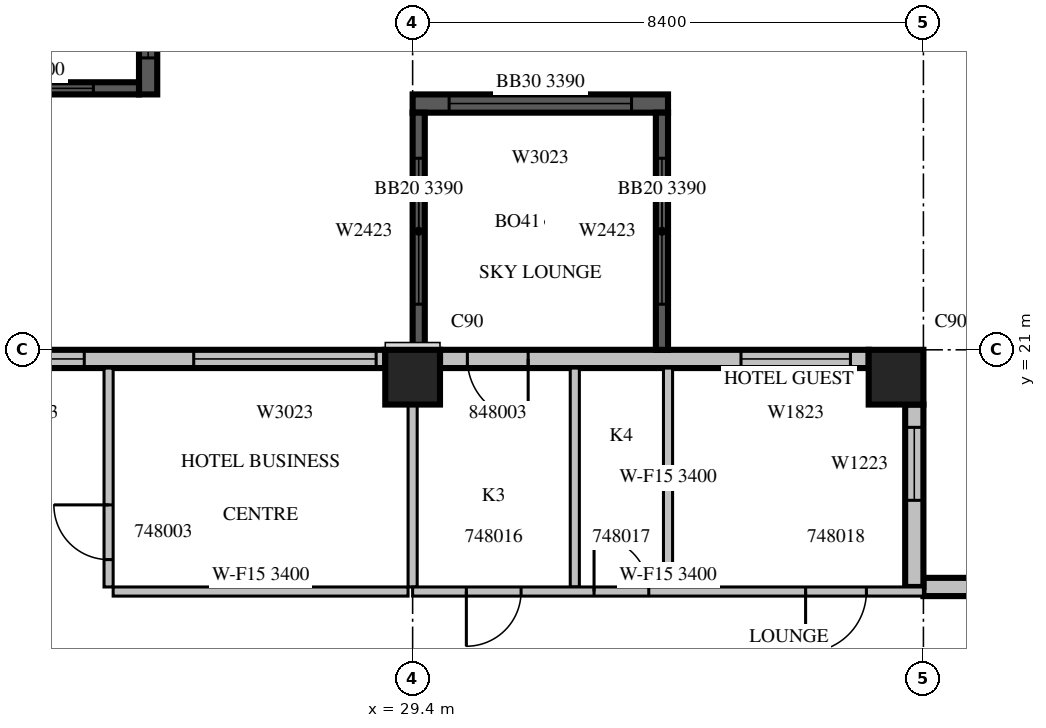
"""IFC4 building model, lengths in metres.
Left out: names, types, materials, properties, quantities, classifications, styles, units other than length and angle.
Written with IfcOpenShell. Run it as: python <this file> out.ifc"""

import sys

from ifc_helpers import new_model, si_unit, direction, frame, frame_2d, origin, origin_2d, place, context, subcontext, project, spatial, rectangle, extrude, source, transform, mapped, element, fill, save


model = new_model("IFC4")
c1 = context("Model", 3, precision=1e-05, world=origin(), true_north=direction((0.0, 1.0)))
c2 = subcontext(c1, "Body", "Model", "MODEL_VIEW")
j1 = project(units=[si_unit("LENGTHUNIT", "METRE"), si_unit("PLANEANGLEUNIT", "RADIAN")], contexts=[c1])
p1 = place(None, origin())
s1 = spatial("IfcSite", under=j1, at=p1, CompositionType="ELEMENT")
p2 = place(p1, origin())
s2 = spatial("IfcBuilding", under=s1, at=p2, CompositionType="ELEMENT")
p3 = place(p2, frame((0.0, 0.0, 215.8)))
s3 = spatial("IfcBuildingStorey", under=s2, at=p3, CompositionType="ELEMENT", Elevation=215.8)
m1 = source(origin(), c2, "Body", "SweptSolid", [
    extrude(rectangle(XDim=0.9, YDim=0.9, at=origin_2d()), origin(), (0.0, 0.0, 1.0), 3.8),
])
for number, where, z_axis, x_axis in (
    (1, (29.4, 20.55, 0.0), (0.0, 0.0, 1.0), (1.0, 0.0, 0.0)),
    (2, (37.35, 20.55, 0.0), (0.0, 0.0, 1.0), (1.0, 0.0, 0.0)),
):
    element("IfcColumn", number, at=place(p3, frame(where, z_axis=z_axis, x_axis=x_axis)), inside=s3, PredefinedType="COLUMN", context=c2, shape_type="MappedRepresentation", body=[
        mapped(m1, transform((0.0, 0.0, 0.0), scale=1.0)),
    ])
m2 = source(origin(), c2, "Body", "SweptSolid", [
    extrude(rectangle(XDim=4.2, YDim=0.3, at=frame_2d((2.1, 0.0))), origin(), (0.0, 0.0, 1.0), 3.4),
])
p4 = place(p3, frame((25.05, 25.2, 0.0), z_axis=(0.0, 0.0, 1.0), x_axis=(0.0, 1.0, 0.0)))
e3 = element("IfcWall", 3, at=p4, inside=s3, PredefinedType="SOLIDWALL", context=c2, shape_type="MappedRepresentation", body=[
    mapped(m2, transform((0.0, 0.0, 0.0), scale=1.0)),
])
m3 = source(origin(), c2, "Body", "SweptSolid", [
    extrude(rectangle(XDim=3.0, YDim=2.3, at=frame_2d((1.5, 1.15))), frame((0.0, 0.16, 0.0), z_axis=(0.0, -1.0, 0.0), x_axis=(1.0, 0.0, 0.0)), (0.0, 0.0, 1.0), 0.32),
])
p5 = place(p4, frame((0.6, 0.0, 0.6)))
e4 = element("IfcOpeningElement", 4, at=p5, cuts=e3, PredefinedType="OPENING", context=c2, shape_type="MappedRepresentation", body=[
    mapped(m3, transform((0.0, 0.0, 0.0), scale=1.0)),
])
m4 = source(origin(), c2, "Body", "SweptSolid", [
    extrude(rectangle(XDim=3.9, YDim=0.2, at=frame_2d((1.95, 0.0))), origin(), (0.0, 0.0, 1.0), 3.4),
])
p6 = place(p3, frame((21.0, 25.3, 0.0), z_axis=(0.0, 0.0, 1.0), x_axis=(1.0, 0.0, 0.0)))
e5 = element("IfcWall", 5, at=p6, inside=s3, PredefinedType="SOLIDWALL", context=c2, shape_type="MappedRepresentation", body=[
    mapped(m4, transform((0.0, 0.0, 0.0), scale=1.0)),
])
m5 = source(origin(), c2, "Body", "SweptSolid", [
    extrude(rectangle(XDim=2.4, YDim=2.3, at=frame_2d((1.2, 1.15))), frame((0.0, 0.11, 0.0), z_axis=(0.0, -1.0, 0.0), x_axis=(1.0, 0.0, 0.0)), (0.0, 0.0, 1.0), 0.22),
])
p7 = place(p6, frame((0.75, 0.0, 0.6)))
e6 = element("IfcOpeningElement", 6, at=p7, cuts=e5, PredefinedType="OPENING", context=c2, shape_type="MappedRepresentation", body=[
    mapped(m5, transform((0.0, 0.0, 0.0), scale=1.0)),
])
p8 = place(p3, frame((53.76, 17.1, 0.0), z_axis=(0.0, 0.0, 1.0), x_axis=(-1.0, 0.0, 0.0)))
e7 = element("IfcWall", 7, at=p8, inside=s3, PredefinedType="STANDARD", context=c2, shape_type="SweptSolid", body=[
    extrude(rectangle(XDim=15.96, YDim=0.3, at=frame_2d((7.98, 0.0))), origin(), (0.0, 0.0, 1.0), 3.4),
])
p9 = place(p8, frame((0.6, 0.0, 0.6)))
e8 = element("IfcOpeningElement", 8, at=p9, cuts=e7, PredefinedType="OPENING", context=c2, shape_type="MappedRepresentation", body=[
    mapped(m3, transform((0.0, 0.0, 0.0), scale=1.0)),
])
p10 = place(p8, frame((4.8, 0.0, 0.6)))
e9 = element("IfcOpeningElement", 9, at=p10, cuts=e7, PredefinedType="OPENING", context=c2, shape_type="MappedRepresentation", body=[
    mapped(m3, transform((0.0, 0.0, 0.0), scale=1.0)),
])
m6 = source(origin(), c2, "Body", "SweptSolid", [
    extrude(rectangle(XDim=3.6, YDim=2.3, at=frame_2d((1.8, 1.15))), frame((0.0, 0.16, 0.0), z_axis=(0.0, -1.0, 0.0), x_axis=(1.0, 0.0, 0.0)), (0.0, 0.0, 1.0), 0.32),
])
p11 = place(p8, frame((9.54, 0.0, 0.6)))
e10 = element("IfcOpeningElement", 10, at=p11, cuts=e7, PredefinedType="OPENING", context=c2, shape_type="MappedRepresentation", body=[
    mapped(m6, transform((0.0, 0.0, 0.0), scale=1.0)),
])
m7 = source(origin(), c2, "Body", "SweptSolid", [
    extrude(rectangle(XDim=3.0, YDim=0.3, at=frame_2d((1.5, 0.0))), origin(), (0.0, 0.0, 1.0), 3.4),
])
p12 = place(p3, frame((37.65, 17.1, 0.0), z_axis=(0.0, 0.0, 1.0), x_axis=(0.0, 1.0, 0.0)))
e11 = element("IfcWall", 11, at=p12, inside=s3, PredefinedType="STANDARD", context=c2, shape_type="MappedRepresentation", body=[
    mapped(m7, transform((0.0, 0.0, 0.0), scale=1.0)),
])
m8 = source(origin(), c2, "Body", "SweptSolid", [
    extrude(rectangle(XDim=1.2, YDim=2.3, at=frame_2d((0.6, 1.15))), frame((0.0, 0.16, 0.0), z_axis=(0.0, -1.0, 0.0), x_axis=(1.0, 0.0, 0.0)), (0.0, 0.0, 1.0), 0.32),
])
p13 = place(p12, frame((1.425, 0.0, 0.6)))
e12 = element("IfcOpeningElement", 12, at=p13, cuts=e11, PredefinedType="OPENING", context=c2, shape_type="MappedRepresentation", body=[
    mapped(m8, transform((0.0, 0.0, 0.0), scale=1.0)),
])
m9 = source(origin(), c2, "Body", "SweptSolid", [
    extrude(rectangle(XDim=7.05, YDim=0.3, at=frame_2d((3.525, 0.0))), origin(), (0.0, 0.0, 1.0), 3.4),
])
p14 = place(p3, frame((36.9, 20.85, 0.0), z_axis=(0.0, 0.0, 1.0), x_axis=(-1.0, 0.0, 0.0)))
e13 = element("IfcWall", 13, at=p14, inside=s3, PredefinedType="STANDARD", context=c2, shape_type="MappedRepresentation", body=[
    mapped(m9, transform((0.0, 0.0, 0.0), scale=1.0)),
])
m10 = source(origin(), c2, "Body", "SweptSolid", [
    extrude(rectangle(XDim=1.8, YDim=2.3, at=frame_2d((0.9, 1.15))), frame((0.0, 0.16, 0.0), z_axis=(0.0, -1.0, 0.0), x_axis=(1.0, 0.0, 0.0)), (0.0, 0.0, 1.0), 0.32),
])
p15 = place(p14, frame((0.3, 0.0, 0.6)))
e14 = element("IfcOpeningElement", 14, at=p15, cuts=e13, PredefinedType="OPENING", context=c2, shape_type="MappedRepresentation", body=[
    mapped(m10, transform((0.0, 0.0, 0.0), scale=1.0)),
])
m11 = source(origin(), c2, "Body", "SweptSolid", [
    extrude(rectangle(XDim=1.0, YDim=2.1, at=frame_2d((0.5, 1.05))), frame((0.0, 0.16, 0.0), z_axis=(0.0, -1.0, 0.0), x_axis=(1.0, 0.0, 0.0)), (0.0, 0.0, 1.0), 0.32),
])
p16 = place(p14, frame((5.6, 0.0, 0.0)))
e15 = element("IfcOpeningElement", 15, at=p16, cuts=e13, PredefinedType="OPENING", context=c2, shape_type="MappedRepresentation", body=[
    mapped(m11, transform((0.0, 0.0, 0.0), scale=1.0)),
])
m12 = source(origin(), c2, "Body", "SweptSolid", [
    extrude(rectangle(XDim=7.15, YDim=0.3, at=frame_2d((3.575, 0.0))), origin(), (0.0, 0.0, 1.0), 3.4),
])
p17 = place(p3, frame((28.95, 20.85, 0.0), z_axis=(0.0, 0.0, 1.0), x_axis=(-1.0, 0.0, 0.0)))
e16 = element("IfcWall", 16, at=p17, inside=s3, PredefinedType="STANDARD", context=c2, shape_type="MappedRepresentation", body=[
    mapped(m12, transform((0.0, 0.0, 0.0), scale=1.0)),
])
p18 = place(p17, frame((0.15, 0.0, 0.6)))
e17 = element("IfcOpeningElement", 17, at=p18, cuts=e16, PredefinedType="OPENING", context=c2, shape_type="MappedRepresentation", body=[
    mapped(m3, transform((0.0, 0.0, 0.0), scale=1.0)),
])
p19 = place(p17, frame((4.95, 0.0, 0.6)))
e18 = element("IfcOpeningElement", 18, at=p19, cuts=e16, PredefinedType="OPENING", context=c2, shape_type="MappedRepresentation", body=[
    mapped(m10, transform((0.0, 0.0, 0.0), scale=1.0)),
])
m13 = source(origin(), c2, "Body", "SweptSolid", [
    extrude(rectangle(XDim=4.2, YDim=0.3, at=frame_2d((2.1, 0.0))), origin(), (0.0, 0.0, 1.0), 3.39),
])
p20 = place(p3, frame((33.6, 25.05, 0.0), z_axis=(0.0, 0.0, 1.0), x_axis=(-1.0, 0.0, 0.0)))
e19 = element("IfcWall", 19, at=p20, inside=s3, PredefinedType="SOLIDWALL", context=c2, shape_type="MappedRepresentation", body=[
    mapped(m13, transform((0.0, 0.0, 0.0), scale=1.0)),
])
p21 = place(p20, frame((0.6, 0.0, 0.6)))
e20 = element("IfcOpeningElement", 20, at=p21, cuts=e19, PredefinedType="OPENING", context=c2, shape_type="MappedRepresentation", body=[
    mapped(m3, transform((0.0, 0.0, 0.0), scale=1.0)),
])
m14 = source(origin(), c2, "Body", "SweptSolid", [
    extrude(rectangle(XDim=3.9, YDim=0.2, at=frame_2d((1.95, 0.0))), origin(), (0.0, 0.0, 1.0), 3.39),
])
p22 = place(p3, frame((33.5, 21.0, 0.0), z_axis=(0.0, 0.0, 1.0), x_axis=(0.0, 1.0, 0.0)))
e21 = element("IfcWall", 21, at=p22, inside=s3, PredefinedType="SOLIDWALL", context=c2, shape_type="MappedRepresentation", body=[
    mapped(m14, transform((0.0, 0.0, 0.0), scale=1.0)),
])
p23 = place(p22, frame((0.75, 0.0, 0.6)))
e22 = element("IfcOpeningElement", 22, at=p23, cuts=e21, PredefinedType="OPENING", context=c2, shape_type="MappedRepresentation", body=[
    mapped(m5, transform((0.0, 0.0, 0.0), scale=1.0)),
])
p24 = place(p3, frame((29.5, 21.0, 0.0), z_axis=(0.0, 0.0, 1.0), x_axis=(0.0, 1.0, 0.0)))
e23 = element("IfcWall", 23, at=p24, inside=s3, PredefinedType="SOLIDWALL", context=c2, shape_type="MappedRepresentation", body=[
    mapped(m14, transform((0.0, 0.0, 0.0), scale=1.0)),
])
p25 = place(p24, frame((0.75, 0.0, 0.6)))
e24 = element("IfcOpeningElement", 24, at=p25, cuts=e23, PredefinedType="OPENING", context=c2, shape_type="MappedRepresentation", body=[
    mapped(m5, transform((0.0, 0.0, 0.0), scale=1.0)),
])
m15 = source(origin(), c2, "Body", "SweptSolid", [
    extrude(rectangle(XDim=3.6, YDim=0.15, at=frame_2d((1.8, 0.0))), origin(), (0.0, 0.0, 1.0), 3.4),
])
p26 = place(p3, frame((24.4, 20.7, 0.0), z_axis=(0.0, 0.0, 1.0), x_axis=(0.0, -1.0, 0.0)))
e25 = element("IfcWall", 25, at=p26, inside=s3, PredefinedType="PARTITIONING", context=c2, shape_type="MappedRepresentation", body=[
    mapped(m15, transform((0.0, 0.0, 0.0), scale=1.0)),
])
m16 = source(origin(), c2, "Body", "SweptSolid", [
    extrude(rectangle(XDim=0.9, YDim=2.1, at=frame_2d((0.45, 1.05))), frame((0.0, 0.085, 0.0), z_axis=(0.0, -1.0, 0.0), x_axis=(1.0, 0.0, 0.0)), (0.0, 0.0, 1.0), 0.17),
])
p27 = place(p26, frame((2.25, 0.0, 0.0)))
e26 = element("IfcOpeningElement", 26, at=p27, cuts=e25, PredefinedType="OPENING", context=c2, shape_type="MappedRepresentation", body=[
    mapped(m16, transform((0.0, 0.0, 0.0), scale=1.0)),
])
m17 = source(origin(), c2, "Body", "SweptSolid", [
    extrude(rectangle(XDim=4.85, YDim=0.15, at=frame_2d((2.425, 0.0))), origin(), (0.0, 0.0, 1.0), 3.4),
])
p28 = place(p3, frame((24.475, 17.025, 0.0), z_axis=(0.0, 0.0, 1.0), x_axis=(1.0, 0.0, 0.0)))
e27 = element("IfcWall", 27, at=p28, inside=s3, PredefinedType="PARTITIONING", context=c2, shape_type="MappedRepresentation", body=[
    mapped(m17, transform((0.0, 0.0, 0.0), scale=1.0)),
])
m18 = source(origin(), c2, "Body", "SweptSolid", [
    extrude(rectangle(XDim=3.001, YDim=0.15, at=frame_2d((1.5, 0.0))), origin(), (0.0, 0.0, 1.0), 3.4),
])
p29 = place(p3, frame((29.4, 17.1, 0.0), z_axis=(0.0, 0.0, 1.0), x_axis=(0.0, 1.0, 0.0)))
e28 = element("IfcWall", 28, at=p29, inside=s3, PredefinedType="PARTITIONING", context=c2, shape_type="MappedRepresentation", body=[
    mapped(m18, transform((0.0, 0.0, 0.0), scale=1.0)),
])
for number, where, z_axis, x_axis in (
    (29, (32.067, 20.7, 0.0), (0.0, 0.0, 1.0), (0.0, -1.0, 0.0)),
    (30, (33.6, 17.1, 0.0), (0.0, 0.0, 1.0), (0.0, 1.0, 0.0)),
):
    element("IfcWall", number, at=place(p3, frame(where, z_axis=z_axis, x_axis=x_axis)), inside=s3, PredefinedType="PARTITIONING", context=c2, shape_type="MappedRepresentation", body=[
        mapped(m15, transform((0.0, 0.0, 0.0), scale=1.0)),
    ])
m19 = source(origin(), c2, "Body", "SweptSolid", [
    extrude(rectangle(XDim=8.4, YDim=0.15, at=frame_2d((4.2, 0.0))), origin(), (0.0, 0.0, 1.0), 3.4),
])
p30 = place(p3, frame((29.4, 17.025, 0.0), z_axis=(0.0, 0.0, 1.0), x_axis=(1.0, 0.0, 0.0)))
e31 = element("IfcWall", 31, at=p30, inside=s3, PredefinedType="PARTITIONING", context=c2, shape_type="MappedRepresentation", body=[
    mapped(m19, transform((0.0, 0.0, 0.0), scale=1.0)),
])
p31 = place(p30, frame((0.883, 0.0, 0.0)))
e32 = element("IfcOpeningElement", 32, at=p31, cuts=e31, PredefinedType="OPENING", context=c2, shape_type="MappedRepresentation", body=[
    mapped(m16, transform((0.0, 0.0, 0.0), scale=1.0)),
])
p32 = place(p30, frame((2.983, 0.0, 0.0)))
e33 = element("IfcOpeningElement", 33, at=p32, cuts=e31, PredefinedType="OPENING", context=c2, shape_type="MappedRepresentation", body=[
    mapped(m16, transform((0.0, 0.0, 0.0), scale=1.0)),
])
m20 = source(origin(), c2, "Body", "SweptSolid", [
    extrude(rectangle(XDim=1.0, YDim=2.1, at=frame_2d((0.5, 1.05))), frame((0.0, 0.085, 0.0), z_axis=(0.0, -1.0, 0.0), x_axis=(1.0, 0.0, 0.0)), (0.0, 0.0, 1.0), 0.17),
])
p33 = place(p30, frame((6.463, 0.0, 0.0)))
e34 = element("IfcOpeningElement", 34, at=p33, cuts=e31, PredefinedType="OPENING", context=c2, shape_type="MappedRepresentation", body=[
    mapped(m20, transform((0.0, 0.0, 0.0), scale=1.0)),
])
m21 = source(origin(), c2, "Body", "SweptSolid", [
    extrude(rectangle(XDim=3.0, YDim=2.3, at=frame_2d((1.5, 1.15))), frame((0.0, 0.03, 0.0), z_axis=(0.0, -1.0, 0.0), x_axis=(1.0, 0.0, 0.0)), (0.0, 0.0, 1.0), 0.06),
])
p34 = place(p5, origin())
e35 = element("IfcWindow", 35, at=p34, inside=s3, PartitioningType="SINGLE_PANEL", PredefinedType="WINDOW", context=c2, shape_type="MappedRepresentation", body=[
    mapped(m21, transform((0.0, 0.0, 0.0), scale=1.0)),
])
fill(e4, e35)
m22 = source(origin(), c2, "Body", "SweptSolid", [
    extrude(rectangle(XDim=2.4, YDim=2.3, at=frame_2d((1.2, 1.15))), frame((0.0, 0.03, 0.0), z_axis=(0.0, -1.0, 0.0), x_axis=(1.0, 0.0, 0.0)), (0.0, 0.0, 1.0), 0.06),
])
p35 = place(p7, origin())
e36 = element("IfcWindow", 36, at=p35, inside=s3, PartitioningType="SINGLE_PANEL", PredefinedType="WINDOW", context=c2, shape_type="MappedRepresentation", body=[
    mapped(m22, transform((0.0, 0.0, 0.0), scale=1.0)),
])
fill(e6, e36)
m23 = source(origin(), c2, "Body", "SweptSolid", [
    extrude(rectangle(XDim=1.2, YDim=2.3, at=frame_2d((0.6, 1.15))), frame((0.0, 0.03, 0.0), z_axis=(0.0, -1.0, 0.0), x_axis=(1.0, 0.0, 0.0)), (0.0, 0.0, 1.0), 0.06),
])
p36 = place(p13, origin())
e37 = element("IfcWindow", 37, at=p36, inside=s3, PartitioningType="SINGLE_PANEL", PredefinedType="WINDOW", context=c2, shape_type="MappedRepresentation", body=[
    mapped(m23, transform((0.0, 0.0, 0.0), scale=1.0)),
])
fill(e12, e37)
m24 = source(origin(), c2, "Body", "SweptSolid", [
    extrude(rectangle(XDim=1.8, YDim=2.3, at=frame_2d((0.9, 1.15))), frame((0.0, 0.03, 0.0), z_axis=(0.0, -1.0, 0.0), x_axis=(1.0, 0.0, 0.0)), (0.0, 0.0, 1.0), 0.06),
])
p37 = place(p15, origin())
e38 = element("IfcWindow", 38, at=p37, inside=s3, PartitioningType="SINGLE_PANEL", PredefinedType="WINDOW", context=c2, shape_type="MappedRepresentation", body=[
    mapped(m24, transform((0.0, 0.0, 0.0), scale=1.0)),
])
fill(e14, e38)
p38 = place(p18, origin())
e39 = element("IfcWindow", 39, at=p38, inside=s3, PartitioningType="SINGLE_PANEL", PredefinedType="WINDOW", context=c2, shape_type="MappedRepresentation", body=[
    mapped(m21, transform((0.0, 0.0, 0.0), scale=1.0)),
])
fill(e17, e39)
p39 = place(p19, origin())
e40 = element("IfcWindow", 40, at=p39, inside=s3, PartitioningType="SINGLE_PANEL", PredefinedType="WINDOW", context=c2, shape_type="MappedRepresentation", body=[
    mapped(m24, transform((0.0, 0.0, 0.0), scale=1.0)),
])
fill(e18, e40)
p40 = place(p21, origin())
e41 = element("IfcWindow", 41, at=p40, inside=s3, PartitioningType="SINGLE_PANEL", PredefinedType="WINDOW", context=c2, shape_type="MappedRepresentation", body=[
    mapped(m21, transform((0.0, 0.0, 0.0), scale=1.0)),
])
fill(e20, e41)
p41 = place(p23, origin())
e42 = element("IfcWindow", 42, at=p41, inside=s3, PartitioningType="SINGLE_PANEL", PredefinedType="WINDOW", context=c2, shape_type="MappedRepresentation", body=[
    mapped(m22, transform((0.0, 0.0, 0.0), scale=1.0)),
])
fill(e22, e42)
p42 = place(p25, origin())
e43 = element("IfcWindow", 43, at=p42, inside=s3, PartitioningType="SINGLE_PANEL", PredefinedType="WINDOW", context=c2, shape_type="MappedRepresentation", body=[
    mapped(m22, transform((0.0, 0.0, 0.0), scale=1.0)),
])
fill(e24, e43)
m25 = source(origin(), c2, "Body", "SweptSolid", [
    extrude(rectangle(XDim=0.9, YDim=2.1, at=frame_2d((0.45, 1.05))), frame((0.0, 0.025, 0.0), z_axis=(0.0, -1.0, 0.0), x_axis=(1.0, 0.0, 0.0)), (0.0, 0.0, 1.0), 0.05),
])
p43 = place(p27, origin())
e44 = element("IfcDoor", 44, at=p43, inside=s3, OperationType="SINGLE_SWING_RIGHT", PredefinedType="DOOR", context=c2, shape_type="MappedRepresentation", body=[
    mapped(m25, transform((0.0, 0.0, 0.0), scale=1.0)),
])
fill(e26, e44)
p44 = place(p31, origin())
e45 = element("IfcDoor", 45, at=p44, inside=s3, OperationType="SINGLE_SWING_RIGHT", PredefinedType="DOOR", context=c2, shape_type="MappedRepresentation", body=[
    mapped(m25, transform((0.0, 0.0, 0.0), scale=1.0)),
])
fill(e32, e45)
p45 = place(p32, origin())
e46 = element("IfcDoor", 46, at=p45, inside=s3, OperationType="SINGLE_SWING_LEFT", PredefinedType="DOOR", context=c2, shape_type="MappedRepresentation", body=[
    mapped(m25, transform((0.0, 0.0, 0.0), scale=1.0)),
])
fill(e33, e46)
m26 = source(origin(), c2, "Body", "SweptSolid", [
    extrude(rectangle(XDim=1.0, YDim=2.1, at=frame_2d((0.5, 1.05))), frame((0.0, 0.025, 0.0), z_axis=(0.0, -1.0, 0.0), x_axis=(1.0, 0.0, 0.0)), (0.0, 0.0, 1.0), 0.05),
])
p46 = place(p33, origin())
e47 = element("IfcDoor", 47, at=p46, inside=s3, OperationType="SINGLE_SWING_RIGHT", PredefinedType="DOOR", context=c2, shape_type="MappedRepresentation", body=[
    mapped(m26, transform((0.0, 0.0, 0.0), scale=1.0)),
])
fill(e34, e47)
p47 = place(p16, origin())
e48 = element("IfcDoor", 48, at=p47, inside=s3, OperationType="SINGLE_SWING_LEFT", PredefinedType="DOOR", context=c2, shape_type="MappedRepresentation", body=[
    mapped(m26, transform((0.0, 0.0, 0.0), scale=1.0)),
])
fill(e15, e48)
save(model, sys.argv[1])
